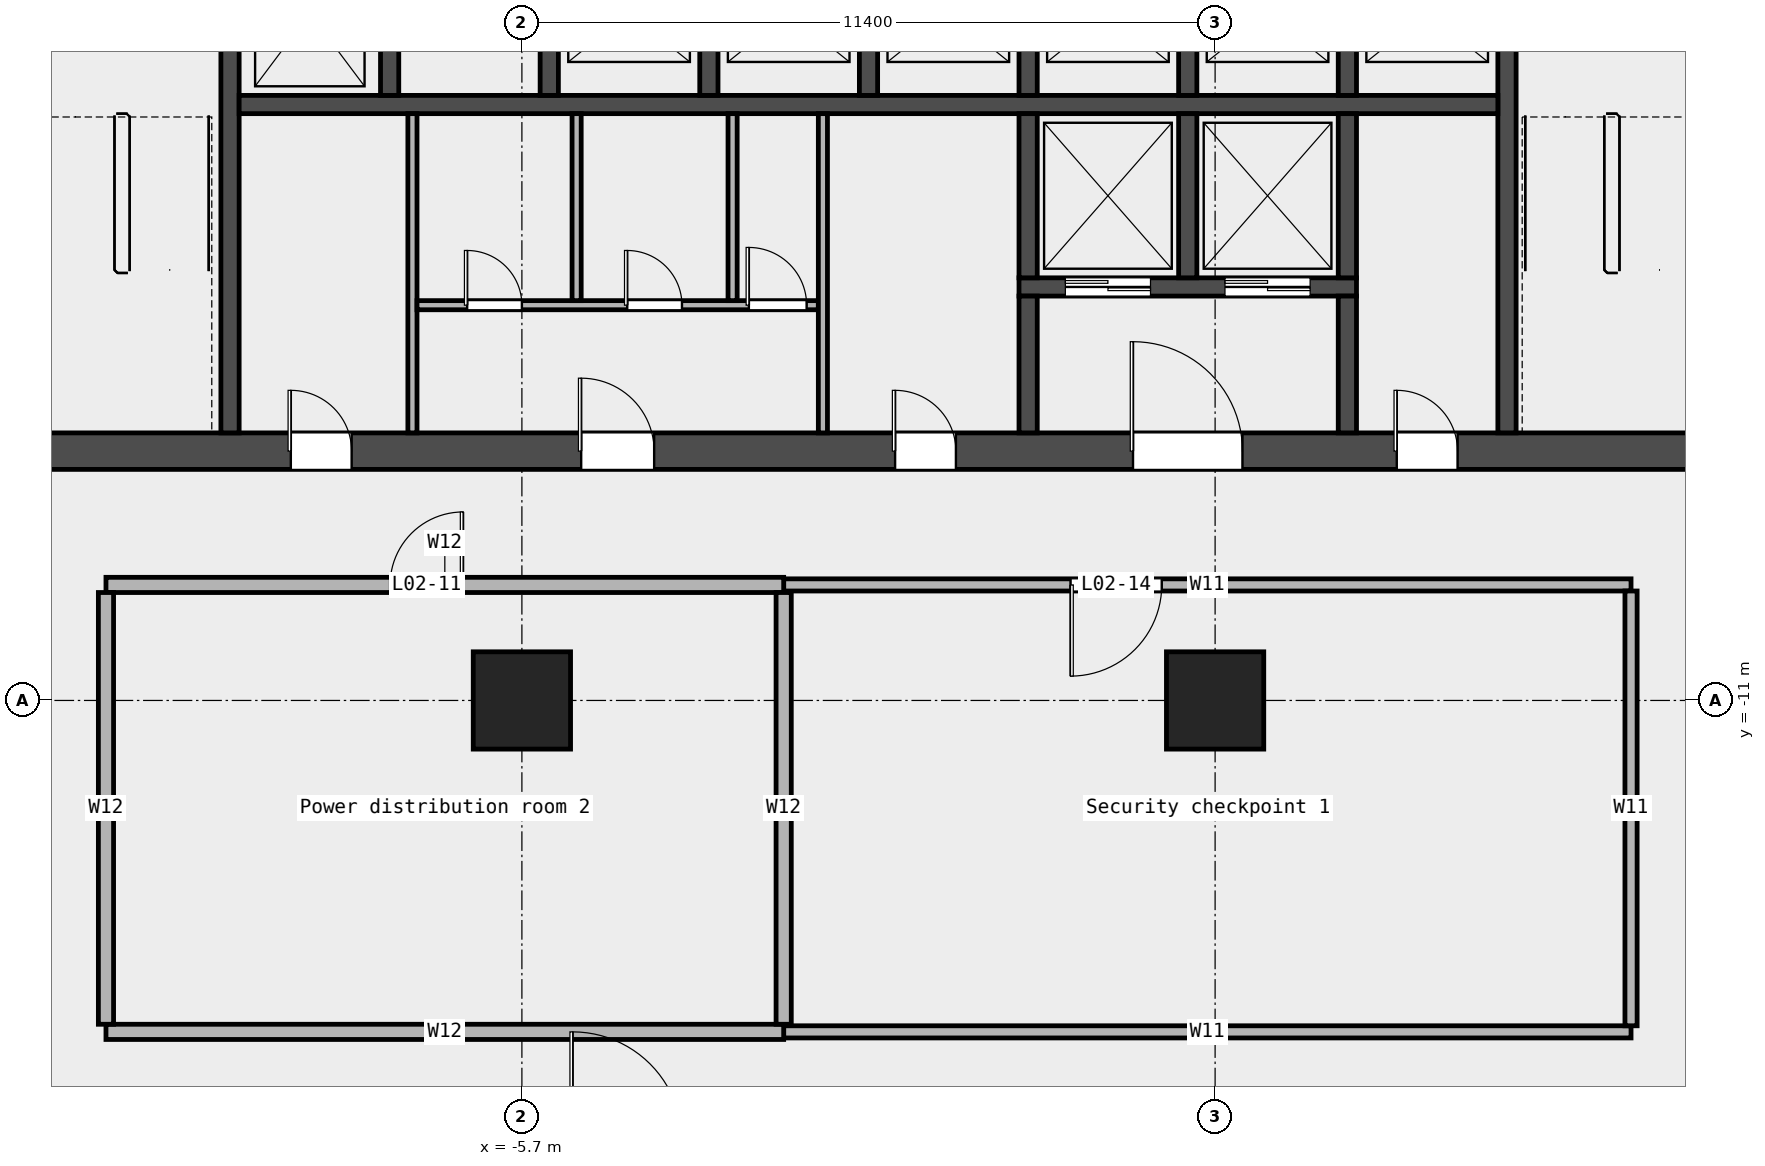
"""IFC4 building model, lengths in metres.
Left out: names, types, materials, properties, quantities, classifications, styles, units other than length and angle.
Written with IfcOpenShell. Run it as: python <this file> out.ifc"""

import sys

from ifc_helpers import new_model, si_unit, direction, frame, frame_2d, origin, origin_2d, place, context, subcontext, project, spatial, rectangle, extrude, element, fill, save


model = new_model("IFC4")
c1 = context("Model", 3, precision=1e-05, world=origin(), true_north=direction((0.0, 1.0)))
c2 = subcontext(c1, "Body", "Model", "MODEL_VIEW")
j1 = project(units=[si_unit("LENGTHUNIT", "METRE"), si_unit("PLANEANGLEUNIT", "RADIAN")], contexts=[c1])
p1 = place(None, origin())
s1 = spatial("IfcSite", under=j1, at=p1, CompositionType="ELEMENT")
p2 = place(p1, origin())
s2 = spatial("IfcBuilding", under=s1, at=p2, CompositionType="ELEMENT")
p3 = place(p2, frame((0.0, 0.0, 14.5)))
s3 = spatial("IfcBuildingStorey", under=s2, at=p3, CompositionType="ELEMENT", Elevation=14.5)
for number, where, z_axis, x_axis in (
    (1, (-5.7, -11.0, 0.0), (0.0, 0.0, 1.0), (1.0, 0.0, 0.0)),
    (2, (5.7, -11.0, 0.0), (0.0, 0.0, 1.0), (1.0, 0.0, 0.0)),
):
    element("IfcColumn", number, at=place(p3, frame(where, z_axis=z_axis, x_axis=x_axis)), inside=s3, PredefinedType="COLUMN", context=c2, shape_type="SweptSolid", body=[
        extrude(rectangle(XDim=1.6, YDim=1.6, at=origin_2d()), origin(), (0.0, 0.0, 1.0), 5.0),
    ])
p4 = place(p3, frame((-1.395, -16.45, 0.0), z_axis=(0.0, 0.0, 1.0), x_axis=(1.0, 0.0, 0.0)))
e3 = element("IfcWall", 3, at=p4, inside=s3, PredefinedType="PARTITIONING", context=c2, shape_type="SweptSolid", body=[
    extrude(rectangle(XDim=13.935, YDim=0.2, at=frame_2d((6.968, 0.0))), origin(), (0.0, 0.0, 1.0), 5.0),
])
p5 = place(p3, frame((-12.54, -16.45, 0.0), z_axis=(0.0, 0.0, 1.0), x_axis=(1.0, 0.0, 0.0)))
e4 = element("IfcWall", 4, at=p5, inside=s3, PredefinedType="PARTITIONING", context=c2, shape_type="SweptSolid", body=[
    extrude(rectangle(XDim=11.145, YDim=0.25, at=frame_2d((5.573, 0.0))), origin(), (0.0, 0.0, 1.0), 5.0),
])
p6 = place(p3, frame((-1.395, -9.1, 0.0), z_axis=(0.0, 0.0, 1.0), x_axis=(1.0, 0.0, 0.0)))
e5 = element("IfcWall", 5, at=p6, inside=s3, PredefinedType="PARTITIONING", context=c2, shape_type="SweptSolid", body=[
    extrude(rectangle(XDim=13.935, YDim=0.2, at=frame_2d((6.968, 0.0))), origin(), (0.0, 0.0, 1.0), 5.0),
])
p7 = place(p6, frame((4.718, 0.0, 0.0)))
e6 = element("IfcOpeningElement", 6, at=p7, cuts=e5, PredefinedType="OPENING", context=c2, shape_type="SweptSolid", body=[
    extrude(rectangle(XDim=1.5, YDim=2.1, at=frame_2d((0.75, 1.05))), frame((0.0, 0.112, 0.0), z_axis=(0.0, -1.0, 0.0), x_axis=(1.0, 0.0, 0.0)), (0.0, 0.0, 1.0), 0.224),
])
p8 = place(p3, frame((-12.54, -9.1, 0.0), z_axis=(0.0, 0.0, 1.0), x_axis=(1.0, 0.0, 0.0)))
e7 = element("IfcWall", 7, at=p8, inside=s3, PredefinedType="PARTITIONING", context=c2, shape_type="SweptSolid", body=[
    extrude(rectangle(XDim=11.145, YDim=0.25, at=frame_2d((5.573, 0.0))), origin(), (0.0, 0.0, 1.0), 5.0),
])
p9 = place(p8, frame((4.673, 0.0, 0.0)))
e8 = element("IfcOpeningElement", 8, at=p9, cuts=e7, PredefinedType="OPENING", context=c2, shape_type="SweptSolid", body=[
    extrude(rectangle(XDim=1.2, YDim=2.1, at=frame_2d((0.6, 1.05))), frame((0.0, 0.137, 0.0), z_axis=(0.0, -1.0, 0.0), x_axis=(1.0, 0.0, 0.0)), (0.0, 0.0, 1.0), 0.274),
])
for number, where, z_axis, x_axis in (
    (9, (-12.54, -16.325, 0.0), (0.0, 0.0, 1.0), (0.0, 1.0, 0.0)),
    (10, (-1.395, -16.325, 0.0), (0.0, 0.0, 1.0), (0.0, 1.0, 0.0)),
):
    element("IfcWall", number, at=place(p3, frame(where, z_axis=z_axis, x_axis=x_axis)), inside=s3, PredefinedType="PARTITIONING", context=c2, shape_type="SweptSolid", body=[
        extrude(rectangle(XDim=7.1, YDim=0.25, at=frame_2d((3.55, 0.0))), origin(), (0.0, 0.0, 1.0), 5.0),
    ])
p10 = place(p3, frame((12.54, -16.35, 0.0), z_axis=(0.0, 0.0, 1.0), x_axis=(0.0, 1.0, 0.0)))
e11 = element("IfcWall", 11, at=p10, inside=s3, PredefinedType="PARTITIONING", context=c2, shape_type="SweptSolid", body=[
    extrude(rectangle(XDim=7.15, YDim=0.2, at=frame_2d((3.575, 0.0))), origin(), (0.0, 0.0, 1.0), 5.0),
])
p11 = place(p3, frame((-14.4, -6.9, 0.0), z_axis=(0.0, 0.0, 1.0), x_axis=(1.0, 0.0, 0.0)))
e12 = element("IfcWall", 12, at=p11, inside=s3, PredefinedType="SHEAR", context=c2, shape_type="SweptSolid", body=[
    extrude(rectangle(XDim=28.8, YDim=0.6, at=frame_2d((14.4, 0.0))), origin(), (0.0, 0.0, 1.0), 5.2),
])
p12 = place(p11, frame((4.9, 0.0, 0.0)))
e13 = element("IfcOpeningElement", 13, at=p12, cuts=e12, PredefinedType="OPENING", context=c2, shape_type="SweptSolid", body=[
    extrude(rectangle(XDim=1.0, YDim=2.1, at=frame_2d((0.5, 1.05))), frame((0.0, 0.312, 0.0), z_axis=(0.0, -1.0, 0.0), x_axis=(1.0, 0.0, 0.0)), (0.0, 0.0, 1.0), 0.624),
])
p13 = place(p11, frame((9.675, 0.0, 0.0)))
e14 = element("IfcOpeningElement", 14, at=p13, cuts=e12, PredefinedType="OPENING", context=c2, shape_type="SweptSolid", body=[
    extrude(rectangle(XDim=1.2, YDim=2.1, at=frame_2d((0.6, 1.05))), frame((0.0, 0.312, 0.0), z_axis=(0.0, -1.0, 0.0), x_axis=(1.0, 0.0, 0.0)), (0.0, 0.0, 1.0), 0.624),
])
p14 = place(p11, frame((14.837, 0.0, 0.0)))
e15 = element("IfcOpeningElement", 15, at=p14, cuts=e12, PredefinedType="OPENING", context=c2, shape_type="SweptSolid", body=[
    extrude(rectangle(XDim=1.0, YDim=2.1, at=frame_2d((0.5, 1.05))), frame((0.0, 0.312, 0.0), z_axis=(0.0, -1.0, 0.0), x_axis=(1.0, 0.0, 0.0)), (0.0, 0.0, 1.0), 0.624),
])
p15 = place(p11, frame((18.75, 0.0, 0.0)))
e16 = element("IfcOpeningElement", 16, at=p15, cuts=e12, PredefinedType="OPENING", context=c2, shape_type="SweptSolid", body=[
    extrude(rectangle(XDim=1.8, YDim=2.1, at=frame_2d((0.9, 1.05))), frame((0.0, 0.312, 0.0), z_axis=(0.0, -1.0, 0.0), x_axis=(1.0, 0.0, 0.0)), (0.0, 0.0, 1.0), 0.624),
])
p16 = place(p11, frame((23.087, 0.0, 0.0)))
e17 = element("IfcOpeningElement", 17, at=p16, cuts=e12, PredefinedType="OPENING", context=c2, shape_type="SweptSolid", body=[
    extrude(rectangle(XDim=1.0, YDim=2.1, at=frame_2d((0.5, 1.05))), frame((0.0, 0.312, 0.0), z_axis=(0.0, -1.0, 0.0), x_axis=(1.0, 0.0, 0.0)), (0.0, 0.0, 1.0), 0.624),
])
for number, where, z_axis, x_axis in (
    (18, (-10.5, -6.6, 0.0), (0.0, 0.0, 1.0), (0.0, 1.0, 0.0)),
    (19, (10.5, -6.6, 0.0), (0.0, 0.0, 1.0), (0.0, 1.0, 0.0)),
):
    element("IfcWall", number, at=place(p3, frame(where, z_axis=z_axis, x_axis=x_axis)), inside=s3, PredefinedType="SHEAR", context=c2, shape_type="SweptSolid", body=[
        extrude(rectangle(XDim=8.55, YDim=0.3, at=frame_2d((4.275, 0.0))), origin(), (0.0, 0.0, 1.0), 5.2),
    ])
p17 = place(p3, frame((-10.35, -1.2, 0.0), z_axis=(0.0, 0.0, 1.0), x_axis=(1.0, 0.0, 0.0)))
e20 = element("IfcWall", 20, at=p17, inside=s3, PredefinedType="SOLIDWALL", context=c2, shape_type="SweptSolid", body=[
    extrude(rectangle(XDim=20.7, YDim=0.3, at=frame_2d((10.35, 0.0))), origin(), (0.0, 0.0, 1.0), 5.2),
])
for number, where, z_axis, x_axis in (
    (21, (-7.875, -1.05, 0.0), (0.0, 0.0, 1.0), (0.0, 1.0, 0.0)),
    (22, (-5.25, -1.05, 0.0), (0.0, 0.0, 1.0), (0.0, 1.0, 0.0)),
    (23, (-2.625, -1.05, 0.0), (0.0, 0.0, 1.0), (0.0, 1.0, 0.0)),
    (24, (0.0, -1.05, 0.0), (0.0, 0.0, 1.0), (0.0, 1.0, 0.0)),
    (25, (2.625, -1.05, 0.0), (0.0, 0.0, 1.0), (0.0, 1.0, 0.0)),
    (26, (5.25, -1.05, 0.0), (0.0, 0.0, 1.0), (0.0, 1.0, 0.0)),
    (27, (7.875, -1.05, 0.0), (0.0, 0.0, 1.0), (0.0, 1.0, 0.0)),
):
    element("IfcWall", number, at=place(p3, frame(where, z_axis=z_axis, x_axis=x_axis)), inside=s3, PredefinedType="SOLIDWALL", context=c2, shape_type="SweptSolid", body=[
        extrude(rectangle(XDim=2.7, YDim=0.3, at=frame_2d((1.35, 0.0))), origin(), (0.0, 0.0, 1.0), 5.2),
    ])
p18 = place(p3, frame((2.475, -4.2, 0.0), z_axis=(0.0, 0.0, 1.0), x_axis=(1.0, 0.0, 0.0)))
e28 = element("IfcWall", 28, at=p18, inside=s3, PredefinedType="SOLIDWALL", context=c2, shape_type="SweptSolid", body=[
    extrude(rectangle(XDim=5.55, YDim=0.3, at=frame_2d((2.775, 0.0))), origin(), (0.0, 0.0, 1.0), 5.2),
])
p19 = place(p18, frame((0.762, 0.0, 0.0)))
e29 = element("IfcOpeningElement", 29, at=p19, cuts=e28, PredefinedType="OPENING", context=c2, shape_type="SweptSolid", body=[
    extrude(rectangle(XDim=1.4, YDim=2.1, at=frame_2d((0.7, 1.05))), frame((0.0, 0.162, 0.0), z_axis=(0.0, -1.0, 0.0), x_axis=(1.0, 0.0, 0.0)), (0.0, 0.0, 1.0), 0.324),
])
p20 = place(p18, frame((3.387, 0.0, 0.0)))
e30 = element("IfcOpeningElement", 30, at=p20, cuts=e28, PredefinedType="OPENING", context=c2, shape_type="SweptSolid", body=[
    extrude(rectangle(XDim=1.4, YDim=2.1, at=frame_2d((0.7, 1.05))), frame((0.0, 0.162, 0.0), z_axis=(0.0, -1.0, 0.0), x_axis=(1.0, 0.0, 0.0)), (0.0, 0.0, 1.0), 0.324),
])
p21 = place(p3, frame((2.625, -4.05, 0.0), z_axis=(0.0, 0.0, 1.0), x_axis=(0.0, 1.0, 0.0)))
e31 = element("IfcWall", 31, at=p21, inside=s3, PredefinedType="SOLIDWALL", context=c2, shape_type="SweptSolid", body=[
    extrude(rectangle(XDim=2.7, YDim=0.3, at=frame_2d((1.35, 0.0))), origin(), (0.0, 0.0, 1.0), 5.2),
])
p22 = place(p3, frame((2.625, -6.6, 0.0), z_axis=(0.0, 0.0, 1.0), x_axis=(0.0, 1.0, 0.0)))
e32 = element("IfcWall", 32, at=p22, inside=s3, PredefinedType="SOLIDWALL", context=c2, shape_type="SweptSolid", body=[
    extrude(rectangle(XDim=2.25, YDim=0.3, at=frame_2d((1.125, 0.0))), origin(), (0.0, 0.0, 1.0), 5.2),
])
for number, where, z_axis, x_axis in (
    (33, (5.25, -4.05, 0.0), (0.0, 0.0, 1.0), (0.0, 1.0, 0.0)),
    (34, (7.875, -4.05, 0.0), (0.0, 0.0, 1.0), (0.0, 1.0, 0.0)),
):
    element("IfcWall", number, at=place(p3, frame(where, z_axis=z_axis, x_axis=x_axis)), inside=s3, PredefinedType="SOLIDWALL", context=c2, shape_type="SweptSolid", body=[
        extrude(rectangle(XDim=2.7, YDim=0.3, at=frame_2d((1.35, 0.0))), origin(), (0.0, 0.0, 1.0), 5.2),
    ])
p23 = place(p3, frame((7.875, -6.6, 0.0), z_axis=(0.0, 0.0, 1.0), x_axis=(0.0, 1.0, 0.0)))
e35 = element("IfcWall", 35, at=p23, inside=s3, PredefinedType="SOLIDWALL", context=c2, shape_type="SweptSolid", body=[
    extrude(rectangle(XDim=2.25, YDim=0.3, at=frame_2d((1.125, 0.0))), origin(), (0.0, 0.0, 1.0), 5.2),
])
p24 = place(p3, frame((-7.5, -6.6, 0.0), z_axis=(0.0, 0.0, 1.0), x_axis=(0.0, 1.0, 0.0)))
e36 = element("IfcWall", 36, at=p24, inside=s3, PredefinedType="PARTITIONING", context=c2, shape_type="SweptSolid", body=[
    extrude(rectangle(XDim=5.25, YDim=0.15, at=frame_2d((2.625, 0.0))), origin(), (0.0, 0.0, 1.0), 5.2),
])
p25 = place(p3, frame((-7.425, -4.5, 0.0), z_axis=(0.0, 0.0, 1.0), x_axis=(1.0, 0.0, 0.0)))
e37 = element("IfcWall", 37, at=p25, inside=s3, PredefinedType="PARTITIONING", context=c2, shape_type="SweptSolid", body=[
    extrude(rectangle(XDim=6.6, YDim=0.15, at=frame_2d((3.3, 0.0))), origin(), (0.0, 0.0, 1.0), 5.2),
])
p26 = place(p25, frame((0.825, 0.0, 0.0)))
e38 = element("IfcOpeningElement", 38, at=p26, cuts=e37, PredefinedType="OPENING", context=c2, shape_type="SweptSolid", body=[
    extrude(rectangle(XDim=0.9, YDim=2.1, at=frame_2d((0.45, 1.05))), frame((0.0, 0.087, 0.0), z_axis=(0.0, -1.0, 0.0), x_axis=(1.0, 0.0, 0.0)), (0.0, 0.0, 1.0), 0.174),
])
p27 = place(p25, frame((3.458, 0.0, 0.0)))
e39 = element("IfcOpeningElement", 39, at=p27, cuts=e37, PredefinedType="OPENING", context=c2, shape_type="SweptSolid", body=[
    extrude(rectangle(XDim=0.9, YDim=2.1, at=frame_2d((0.45, 1.05))), frame((0.0, 0.087, 0.0), z_axis=(0.0, -1.0, 0.0), x_axis=(1.0, 0.0, 0.0)), (0.0, 0.0, 1.0), 0.174),
])
p28 = place(p25, frame((5.458, 0.0, 0.0)))
e40 = element("IfcOpeningElement", 40, at=p28, cuts=e37, PredefinedType="OPENING", context=c2, shape_type="SweptSolid", body=[
    extrude(rectangle(XDim=0.95, YDim=2.1, at=frame_2d((0.475, 1.05))), frame((0.0, 0.087, 0.0), z_axis=(0.0, -1.0, 0.0), x_axis=(1.0, 0.0, 0.0)), (0.0, 0.0, 1.0), 0.174),
])
for number, where, z_axis, x_axis in (
    (41, (-4.8, -4.425, 0.0), (0.0, 0.0, 1.0), (0.0, 1.0, 0.0)),
    (42, (-2.235, -4.425, 0.0), (0.0, 0.0, 1.0), (0.0, 1.0, 0.0)),
):
    element("IfcWall", number, at=place(p3, frame(where, z_axis=z_axis, x_axis=x_axis)), inside=s3, PredefinedType="PARTITIONING", context=c2, shape_type="SweptSolid", body=[
        extrude(rectangle(XDim=3.075, YDim=0.15, at=frame_2d((1.538, 0.0))), origin(), (0.0, 0.0, 1.0), 5.2),
    ])
p29 = place(p3, frame((-0.75, -6.6, 0.0), z_axis=(0.0, 0.0, 1.0), x_axis=(0.0, 1.0, 0.0)))
e43 = element("IfcWall", 43, at=p29, inside=s3, PredefinedType="PARTITIONING", context=c2, shape_type="SweptSolid", body=[
    extrude(rectangle(XDim=5.25, YDim=0.15, at=frame_2d((2.625, 0.0))), origin(), (0.0, 0.0, 1.0), 5.2),
])
p30 = place(p9, origin())
e44 = element("IfcDoor", 44, at=p30, inside=s3, OperationType="SINGLE_SWING_RIGHT", PredefinedType="DOOR", context=c2, shape_type="SweptSolid", body=[
    extrude(rectangle(XDim=1.2, YDim=2.1, at=frame_2d((0.6, 1.05))), frame((0.0, 0.025, 0.0), z_axis=(0.0, -1.0, 0.0), x_axis=(1.0, 0.0, 0.0)), (0.0, 0.0, 1.0), 0.05),
])
fill(e8, e44)
p31 = place(p7, origin())
e45 = element("IfcDoor", 45, at=p31, inside=s3, OperationType="DOUBLE_DOOR_SINGLE_SWING", PredefinedType="DOOR", context=c2, shape_type="SweptSolid", body=[
    extrude(rectangle(XDim=1.5, YDim=2.1, at=frame_2d((0.75, 1.05))), frame((0.0, 0.025, 0.0), z_axis=(0.0, -1.0, 0.0), x_axis=(1.0, 0.0, 0.0)), (0.0, 0.0, 1.0), 0.05),
])
fill(e6, e45)
p32 = place(p19, origin())
e46 = element("IfcDoor", 46, at=p32, inside=s3, OperationType="DOUBLE_DOOR_SLIDING", PredefinedType="DOOR", context=c2, shape_type="SweptSolid", body=[
    extrude(rectangle(XDim=1.4, YDim=2.1, at=frame_2d((0.7, 1.05))), frame((0.0, 0.025, 0.0), z_axis=(0.0, -1.0, 0.0), x_axis=(1.0, 0.0, 0.0)), (0.0, 0.0, 1.0), 0.05),
])
fill(e29, e46)
p33 = place(p20, origin())
e47 = element("IfcDoor", 47, at=p33, inside=s3, OperationType="DOUBLE_DOOR_SLIDING", PredefinedType="DOOR", context=c2, shape_type="SweptSolid", body=[
    extrude(rectangle(XDim=1.4, YDim=2.1, at=frame_2d((0.7, 1.05))), frame((0.0, 0.025, 0.0), z_axis=(0.0, -1.0, 0.0), x_axis=(1.0, 0.0, 0.0)), (0.0, 0.0, 1.0), 0.05),
])
fill(e30, e47)
p34 = place(p12, origin())
e48 = element("IfcDoor", 48, at=p34, inside=s3, OperationType="SINGLE_SWING_LEFT", PredefinedType="DOOR", context=c2, shape_type="SweptSolid", body=[
    extrude(rectangle(XDim=1.0, YDim=2.1, at=frame_2d((0.5, 1.05))), frame((0.0, 0.025, 0.0), z_axis=(0.0, -1.0, 0.0), x_axis=(1.0, 0.0, 0.0)), (0.0, 0.0, 1.0), 0.05),
])
fill(e13, e48)
p35 = place(p13, origin())
e49 = element("IfcDoor", 49, at=p35, inside=s3, OperationType="SINGLE_SWING_LEFT", PredefinedType="DOOR", context=c2, shape_type="SweptSolid", body=[
    extrude(rectangle(XDim=1.2, YDim=2.1, at=frame_2d((0.6, 1.05))), frame((0.0, 0.025, 0.0), z_axis=(0.0, -1.0, 0.0), x_axis=(1.0, 0.0, 0.0)), (0.0, 0.0, 1.0), 0.05),
])
fill(e14, e49)
p36 = place(p26, origin())
e50 = element("IfcDoor", 50, at=p36, inside=s3, OperationType="SINGLE_SWING_LEFT", PredefinedType="DOOR", context=c2, shape_type="SweptSolid", body=[
    extrude(rectangle(XDim=0.9, YDim=2.1, at=frame_2d((0.45, 1.05))), frame((0.0, 0.025, 0.0), z_axis=(0.0, -1.0, 0.0), x_axis=(1.0, 0.0, 0.0)), (0.0, 0.0, 1.0), 0.05),
])
fill(e38, e50)
p37 = place(p27, origin())
e51 = element("IfcDoor", 51, at=p37, inside=s3, OperationType="SINGLE_SWING_LEFT", PredefinedType="DOOR", context=c2, shape_type="SweptSolid", body=[
    extrude(rectangle(XDim=0.9, YDim=2.1, at=frame_2d((0.45, 1.05))), frame((0.0, 0.025, 0.0), z_axis=(0.0, -1.0, 0.0), x_axis=(1.0, 0.0, 0.0)), (0.0, 0.0, 1.0), 0.05),
])
fill(e39, e51)
p38 = place(p28, origin())
e52 = element("IfcDoor", 52, at=p38, inside=s3, OperationType="SINGLE_SWING_LEFT", PredefinedType="DOOR", context=c2, shape_type="SweptSolid", body=[
    extrude(rectangle(XDim=0.95, YDim=2.1, at=frame_2d((0.475, 1.05))), frame((0.0, 0.025, 0.0), z_axis=(0.0, -1.0, 0.0), x_axis=(1.0, 0.0, 0.0)), (0.0, 0.0, 1.0), 0.05),
])
fill(e40, e52)
p39 = place(p14, origin())
e53 = element("IfcDoor", 53, at=p39, inside=s3, OperationType="SINGLE_SWING_LEFT", PredefinedType="DOOR", context=c2, shape_type="SweptSolid", body=[
    extrude(rectangle(XDim=1.0, YDim=2.1, at=frame_2d((0.5, 1.05))), frame((0.0, 0.025, 0.0), z_axis=(0.0, -1.0, 0.0), x_axis=(1.0, 0.0, 0.0)), (0.0, 0.0, 1.0), 0.05),
])
fill(e15, e53)
p40 = place(p15, origin())
e54 = element("IfcDoor", 54, at=p40, inside=s3, OperationType="DOUBLE_DOOR_SINGLE_SWING", PredefinedType="DOOR", context=c2, shape_type="SweptSolid", body=[
    extrude(rectangle(XDim=1.8, YDim=2.1, at=frame_2d((0.9, 1.05))), frame((0.0, 0.025, 0.0), z_axis=(0.0, -1.0, 0.0), x_axis=(1.0, 0.0, 0.0)), (0.0, 0.0, 1.0), 0.05),
])
fill(e16, e54)
p41 = place(p16, origin())
e55 = element("IfcDoor", 55, at=p41, inside=s3, OperationType="SINGLE_SWING_LEFT", PredefinedType="DOOR", context=c2, shape_type="SweptSolid", body=[
    extrude(rectangle(XDim=1.0, YDim=2.1, at=frame_2d((0.5, 1.05))), frame((0.0, 0.025, 0.0), z_axis=(0.0, -1.0, 0.0), x_axis=(1.0, 0.0, 0.0)), (0.0, 0.0, 1.0), 0.05),
])
fill(e17, e55)
save(model, sys.argv[1])
